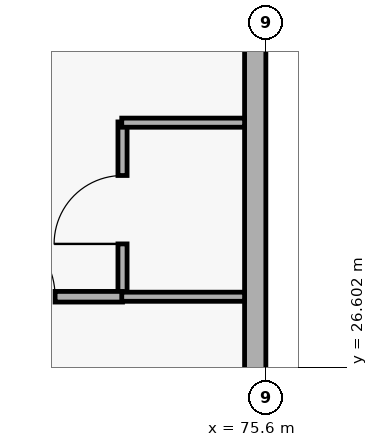
"""IFC4 building model, lengths in metres.
Left out: names, types, materials, properties, quantities, classifications, styles, units other than length and angle.
Written with IfcOpenShell. Run it as: python <this file> out.ifc"""

import sys

from ifc_helpers import new_model, si_unit, direction, frame, frame_2d, origin, place, context, subcontext, project, spatial, rectangle, extrude, element, fill, save


model = new_model("IFC4")
c1 = context("Model", 3, precision=1e-05, world=origin(), true_north=direction((0.0, 1.0)))
c2 = subcontext(c1, "Body", "Model", "MODEL_VIEW")
j1 = project(units=[si_unit("LENGTHUNIT", "METRE"), si_unit("PLANEANGLEUNIT", "RADIAN")], contexts=[c1])
p1 = place(None, origin())
s1 = spatial("IfcSite", under=j1, at=p1, CompositionType="ELEMENT")
p2 = place(p1, origin())
s2 = spatial("IfcBuilding", under=s1, at=p2, CompositionType="ELEMENT")
p3 = place(p2, frame((0.0, 0.0, 37.2)))
s3 = spatial("IfcBuildingStorey", under=s2, at=p3, CompositionType="ELEMENT", Elevation=37.2)
p4 = place(p3, frame((75.46, 34.0, 0.0), z_axis=(0.0, 0.0, 1.0), x_axis=(0.0, -1.0, 0.0)))
e1 = element("IfcWall", 1, at=p4, inside=s3, PredefinedType="SOLIDWALL", context=c2, shape_type="SweptSolid", body=[
    extrude(rectangle(XDim=25.2, YDim=0.28, at=frame_2d((12.6, 0.0))), origin(), (0.0, 0.0, 1.0), 3.34),
])
p5 = place(p4, frame((21.9, 0.0, 0.95)))
e2 = element("IfcOpeningElement", 2, at=p5, cuts=e1, PredefinedType="OPENING", context=c2, shape_type="SweptSolid", body=[
    extrude(rectangle(XDim=1.6, YDim=1.6, at=frame_2d((0.8, 0.8))), frame((0.0, 0.15, 0.0), z_axis=(0.0, -1.0, 0.0), x_axis=(1.0, 0.0, 0.0)), (0.0, 0.0, 1.0), 0.3),
])
p6 = place(p3, frame((73.714, 27.52, 0.0), z_axis=(0.0, 0.0, 1.0), x_axis=(0.0, 1.0, 0.0)))
e3 = element("IfcWall", 3, at=p6, inside=s3, PredefinedType="PARTITIONING", context=c2, shape_type="SweptSolid", body=[
    extrude(rectangle(XDim=2.31, YDim=0.12, at=frame_2d((1.155, 0.0))), origin(), (0.0, 0.0, 1.0), 2.48),
])
p7 = place(p6, frame((0.705, 0.0, 0.0)))
e4 = element("IfcOpeningElement", 4, at=p7, cuts=e3, PredefinedType="OPENING", context=c2, shape_type="SweptSolid", body=[
    extrude(rectangle(XDim=0.9, YDim=2.18, at=frame_2d((0.45, 1.09))), frame((0.0, 0.07, 0.0), z_axis=(0.0, -1.0, 0.0), x_axis=(1.0, 0.0, 0.0)), (0.0, 0.0, 1.0), 0.14),
])
p8 = place(p3, frame((71.204, 27.53, 0.0), z_axis=(0.0, 0.0, 1.0), x_axis=(1.0, 0.0, 0.0)))
e5 = element("IfcWall", 5, at=p8, inside=s3, PredefinedType="PARTITIONING", context=c2, shape_type="SweptSolid", body=[
    extrude(rectangle(XDim=2.51, YDim=0.14, at=frame_2d((1.255, 0.0))), origin(), (0.0, 0.0, 1.0), 2.48),
])
p9 = place(p8, frame((0.623, 0.0, 0.0)))
e6 = element("IfcOpeningElement", 6, at=p9, cuts=e5, PredefinedType="OPENING", context=c2, shape_type="SweptSolid", body=[
    extrude(rectangle(XDim=1.0, YDim=2.28, at=frame_2d((0.5, 1.14))), frame((0.0, 0.08, 0.0), z_axis=(0.0, -1.0, 0.0), x_axis=(1.0, 0.0, 0.0)), (0.0, 0.0, 1.0), 0.16),
])
for number, where, z_axis, x_axis in (
    (7, (73.704, 27.53, 0.0), (0.0, 0.0, 1.0), (1.0, 0.0, 0.0)),
    (8, (73.704, 29.82, 0.0), (0.0, 0.0, 1.0), (1.0, 0.0, 0.0)),
):
    element("IfcWall", number, at=place(p3, frame(where, z_axis=z_axis, x_axis=x_axis)), inside=s3, PredefinedType="PARTITIONING", context=c2, shape_type="SweptSolid", body=[
        extrude(rectangle(XDim=1.616, YDim=0.12, at=frame_2d((0.808, 0.0))), origin(), (0.0, 0.0, 1.0), 2.48),
    ])
p10 = place(p7, origin())
e9 = element("IfcDoor", 9, at=p10, inside=s3, OperationType="SINGLE_SWING_LEFT", PredefinedType="DOOR", context=c2, shape_type="SweptSolid", body=[
    extrude(rectangle(XDim=0.9, YDim=2.18, at=frame_2d((0.45, 1.09))), frame((0.0, 0.025, 0.0), z_axis=(0.0, -1.0, 0.0), x_axis=(1.0, 0.0, 0.0)), (0.0, 0.0, 1.0), 0.05),
])
fill(e4, e9)
p11 = place(p9, origin())
e10 = element("IfcDoor", 10, at=p11, inside=s3, OperationType="SINGLE_SWING_LEFT", PredefinedType="DOOR", context=c2, shape_type="SweptSolid", body=[
    extrude(rectangle(XDim=1.0, YDim=2.28, at=frame_2d((0.5, 1.14))), frame((0.0, 0.025, 0.0), z_axis=(0.0, -1.0, 0.0), x_axis=(1.0, 0.0, 0.0)), (0.0, 0.0, 1.0), 0.05),
])
fill(e6, e10)
save(model, sys.argv[1])
